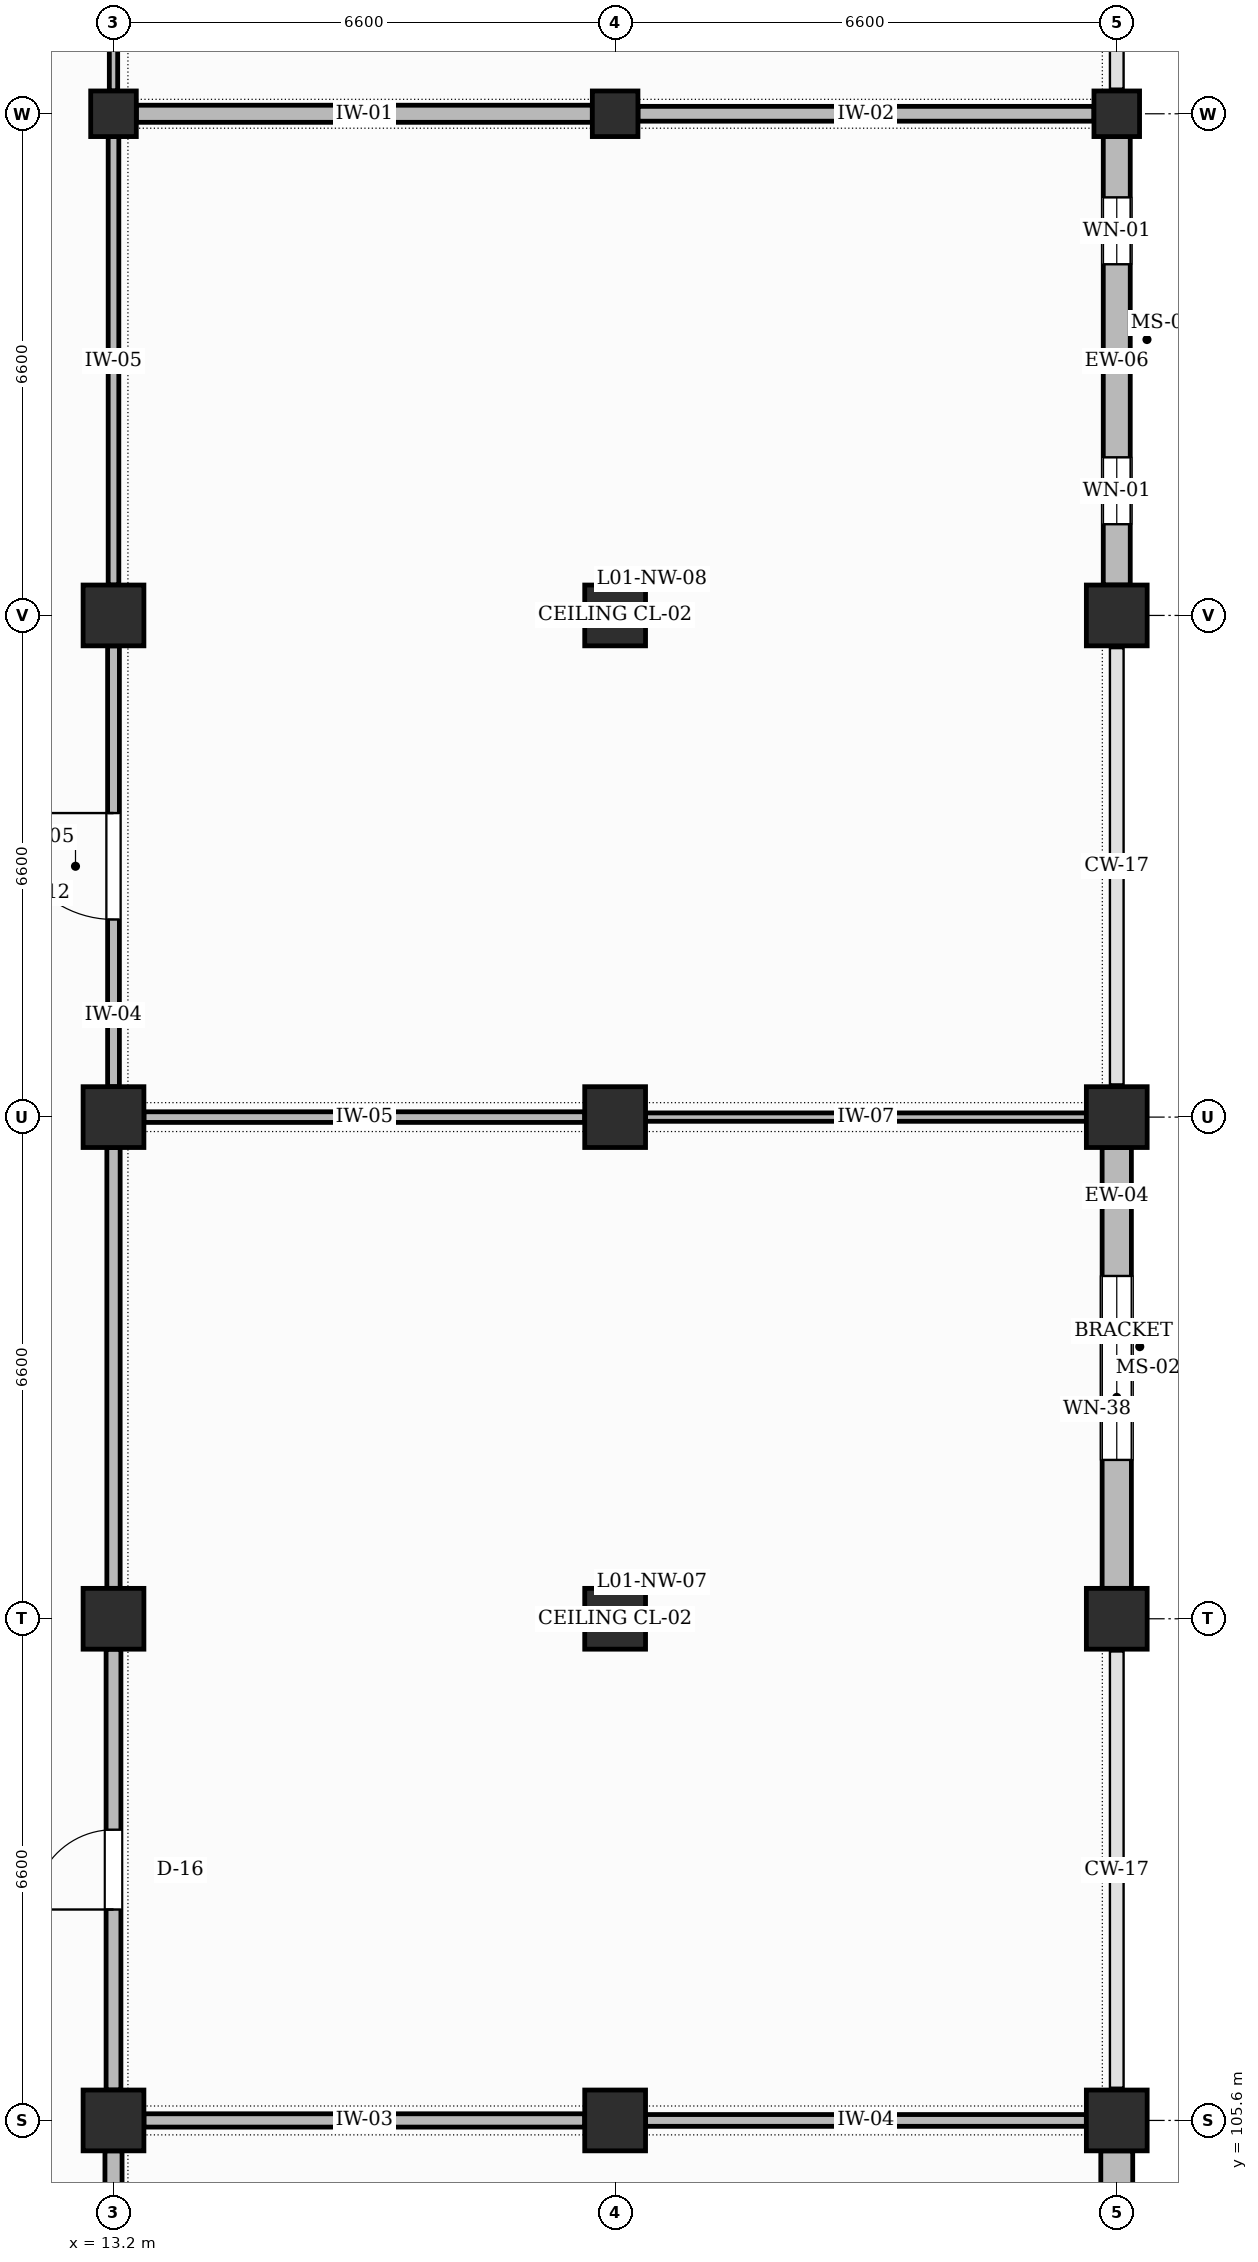
"""IFC4 building model, lengths in metres.
Left out: names, types, materials, properties, quantities, classifications, styles, units other than length and angle.
Written with IfcOpenShell. Run it as: python <this file> out.ifc"""

import sys

from ifc_helpers import new_model, si_unit, direction, frame, frame_2d, origin, origin_2d, place, context, subcontext, project, spatial, rectangle, circle, extrude, element, fill, save


model = new_model("IFC4")
c1 = context("Model", 3, precision=1e-05, world=origin(), true_north=direction((0.0, 1.0)))
c2 = subcontext(c1, "Body", "Model", "MODEL_VIEW")
j1 = project(units=[si_unit("LENGTHUNIT", "METRE"), si_unit("PLANEANGLEUNIT", "RADIAN")], contexts=[c1])
p1 = place(None, origin())
s1 = spatial("IfcSite", under=j1, at=p1, CompositionType="ELEMENT")
p2 = place(p1, origin())
s2 = spatial("IfcBuilding", under=s1, at=p2, CompositionType="ELEMENT")
p3 = place(p2, frame((0.0, 0.0, 5.4)))
s3 = spatial("IfcBuildingStorey", under=s2, at=p3, CompositionType="ELEMENT", Elevation=5.4)
for number, where, z_axis, x_axis in (
    (1, (13.2, 105.6, 0.0), (0.0, 0.0, 1.0), (1.0, 0.0, 0.0)),
    (2, (13.2, 112.2, 0.0), (0.0, 0.0, 1.0), (1.0, 0.0, 0.0)),
    (3, (13.2, 118.8, 0.0), (0.0, 0.0, 1.0), (1.0, 0.0, 0.0)),
    (4, (13.2, 125.4, 0.0), (0.0, 0.0, 1.0), (1.0, 0.0, 0.0)),
):
    element("IfcColumn", number, at=place(p3, frame(where, z_axis=z_axis, x_axis=x_axis)), inside=s3, PredefinedType="COLUMN", context=c2, shape_type="SweptSolid", body=[
        extrude(rectangle(XDim=0.8, YDim=0.8, at=origin_2d()), origin(), (0.0, 0.0, 1.0), 4.8),
    ])
p4 = place(p3, frame((13.2, 132.0, 0.0), z_axis=(0.0, 0.0, 1.0), x_axis=(1.0, 0.0, 0.0)))
e5 = element("IfcColumn", 5, at=p4, inside=s3, PredefinedType="COLUMN", context=c2, shape_type="SweptSolid", body=[
    extrude(circle(Radius=0.3, at=origin_2d()), origin(), (0.0, 0.0, 1.0), 4.8),
])
for number, where, z_axis, x_axis in (
    (6, (19.8, 105.6, 0.0), (0.0, 0.0, 1.0), (1.0, 0.0, 0.0)),
    (7, (19.8, 112.2, 0.0), (0.0, 0.0, 1.0), (1.0, 0.0, 0.0)),
    (8, (19.8, 118.8, 0.0), (0.0, 0.0, 1.0), (1.0, 0.0, 0.0)),
    (9, (19.8, 125.4, 0.0), (0.0, 0.0, 1.0), (1.0, 0.0, 0.0)),
):
    element("IfcColumn", number, at=place(p3, frame(where, z_axis=z_axis, x_axis=x_axis)), inside=s3, PredefinedType="COLUMN", context=c2, shape_type="SweptSolid", body=[
        extrude(rectangle(XDim=0.8, YDim=0.8, at=origin_2d()), origin(), (0.0, 0.0, 1.0), 4.8),
    ])
p5 = place(p3, frame((19.8, 132.0, 0.0), z_axis=(0.0, 0.0, 1.0), x_axis=(1.0, 0.0, 0.0)))
e10 = element("IfcColumn", 10, at=p5, inside=s3, PredefinedType="COLUMN", context=c2, shape_type="SweptSolid", body=[
    extrude(circle(Radius=0.3, at=origin_2d()), origin(), (0.0, 0.0, 1.0), 4.8),
])
for number, where, z_axis, x_axis in (
    (11, (26.4, 105.6, 0.0), (0.0, 0.0, 1.0), (1.0, 0.0, 0.0)),
    (12, (26.4, 112.2, 0.0), (0.0, 0.0, 1.0), (1.0, 0.0, 0.0)),
    (13, (26.4, 118.8, 0.0), (0.0, 0.0, 1.0), (1.0, 0.0, 0.0)),
    (14, (26.4, 125.4, 0.0), (0.0, 0.0, 1.0), (1.0, 0.0, 0.0)),
):
    element("IfcColumn", number, at=place(p3, frame(where, z_axis=z_axis, x_axis=x_axis)), inside=s3, PredefinedType="COLUMN", context=c2, shape_type="SweptSolid", body=[
        extrude(rectangle(XDim=0.8, YDim=0.8, at=origin_2d()), origin(), (0.0, 0.0, 1.0), 4.8),
    ])
p6 = place(p3, frame((26.4, 132.0, 0.0), z_axis=(0.0, 0.0, 1.0), x_axis=(1.0, 0.0, 0.0)))
e15 = element("IfcColumn", 15, at=p6, inside=s3, PredefinedType="COLUMN", context=c2, shape_type="SweptSolid", body=[
    extrude(circle(Radius=0.3, at=origin_2d()), origin(), (0.0, 0.0, 1.0), 4.8),
])
p7 = place(p3, frame((26.4, 99.4, 0.0), z_axis=(0.0, 0.0, 1.0), x_axis=(0.0, 1.0, 0.0)))
e16 = element("IfcWall", 16, at=p7, inside=s3, PredefinedType="SOLIDWALL", context=c2, shape_type="SweptSolid", body=[
    extrude(rectangle(XDim=5.8, YDim=0.42, at=frame_2d((2.9, 0.0))), origin(), (0.0, 0.0, 1.0), 3.85),
])
p8 = place(p7, frame((2.07, 0.0, 0.95)))
e17 = element("IfcOpeningElement", 17, at=p8, cuts=e16, PredefinedType="OPENING", context=c2, shape_type="SweptSolid", body=[
    extrude(rectangle(XDim=1.66, YDim=2.14, at=frame_2d((0.83, 1.07))), frame((0.0, 0.22, 0.0), z_axis=(0.0, -1.0, 0.0), x_axis=(1.0, 0.0, 0.0)), (0.0, 0.0, 1.0), 0.44),
])
p9 = place(p3, frame((26.4, 112.6, 0.0), z_axis=(0.0, 0.0, 1.0), x_axis=(0.0, 1.0, 0.0)))
e18 = element("IfcWall", 18, at=p9, inside=s3, PredefinedType="SOLIDWALL", context=c2, shape_type="SweptSolid", body=[
    extrude(rectangle(XDim=5.8, YDim=0.385, at=frame_2d((2.9, 0.0))), origin(), (0.0, 0.0, 1.0), 3.85),
])
p10 = place(p9, frame((1.69, 0.0, 0.95)))
e19 = element("IfcOpeningElement", 19, at=p10, cuts=e18, PredefinedType="OPENING", context=c2, shape_type="SweptSolid", body=[
    extrude(rectangle(XDim=2.42, YDim=1.68, at=frame_2d((1.21, 0.84))), frame((0.0, 0.202, 0.0), z_axis=(0.0, -1.0, 0.0), x_axis=(1.0, 0.0, 0.0)), (0.0, 0.0, 1.0), 0.405),
])
p11 = place(p3, frame((26.4, 125.8, 0.0), z_axis=(0.0, 0.0, 1.0), x_axis=(0.0, 1.0, 0.0)))
e20 = element("IfcWall", 20, at=p11, inside=s3, PredefinedType="SOLIDWALL", context=c2, shape_type="SweptSolid", body=[
    extrude(rectangle(XDim=5.9, YDim=0.355, at=frame_2d((2.95, 0.0))), origin(), (0.0, 0.0, 1.0), 3.85),
])
p12 = place(p11, frame((0.8, 0.0, 0.95)))
e21 = element("IfcOpeningElement", 21, at=p12, cuts=e20, PredefinedType="OPENING", context=c2, shape_type="SweptSolid", body=[
    extrude(rectangle(XDim=0.88, YDim=1.3, at=frame_2d((0.44, 0.65))), frame((0.0, 0.188, 0.0), z_axis=(0.0, -1.0, 0.0), x_axis=(1.0, 0.0, 0.0)), (0.0, 0.0, 1.0), 0.375),
])
p13 = place(p11, frame((4.22, 0.0, 0.95)))
e22 = element("IfcOpeningElement", 22, at=p13, cuts=e20, PredefinedType="OPENING", context=c2, shape_type="SweptSolid", body=[
    extrude(rectangle(XDim=0.88, YDim=1.3, at=frame_2d((0.44, 0.65))), frame((0.0, 0.188, 0.0), z_axis=(0.0, -1.0, 0.0), x_axis=(1.0, 0.0, 0.0)), (0.0, 0.0, 1.0), 0.375),
])
p14 = place(p3, frame((13.2, 99.4, 0.0), z_axis=(0.0, 0.0, 1.0), x_axis=(0.0, 1.0, 0.0)))
e23 = element("IfcWall", 23, at=p14, inside=s3, PredefinedType="PARTITIONING", context=c2, shape_type="SweptSolid", body=[
    extrude(rectangle(XDim=5.8, YDim=0.225, at=frame_2d((2.9, 0.0))), origin(), (0.0, 0.0, 1.0), 3.7),
])
p15 = place(p3, frame((13.2, 106.0, 0.0), z_axis=(0.0, 0.0, 1.0), x_axis=(0.0, 1.0, 0.0)))
e24 = element("IfcWall", 24, at=p15, inside=s3, PredefinedType="PARTITIONING", context=c2, shape_type="SweptSolid", body=[
    extrude(rectangle(XDim=5.8, YDim=0.195, at=frame_2d((2.9, 0.0))), origin(), (0.0, 0.0, 1.0), 3.7),
])
p16 = place(p15, frame((2.375, 0.0, 0.0)))
e25 = element("IfcOpeningElement", 25, at=p16, cuts=e24, PredefinedType="OPENING", context=c2, shape_type="SweptSolid", body=[
    extrude(rectangle(XDim=1.05, YDim=2.15, at=frame_2d((0.525, 1.075))), frame((0.0, 0.107, 0.0), z_axis=(0.0, -1.0, 0.0), x_axis=(1.0, 0.0, 0.0)), (0.0, 0.0, 1.0), 0.215),
])
p17 = place(p3, frame((13.2, 112.6, 0.0), z_axis=(0.0, 0.0, 1.0), x_axis=(0.0, 1.0, 0.0)))
e26 = element("IfcWall", 26, at=p17, inside=s3, PredefinedType="PARTITIONING", context=c2, shape_type="SweptSolid", body=[
    extrude(rectangle(XDim=5.8, YDim=0.175, at=frame_2d((2.9, 0.0))), origin(), (0.0, 0.0, 1.0), 3.7),
])
p18 = place(p3, frame((13.2, 119.2, 0.0), z_axis=(0.0, 0.0, 1.0), x_axis=(0.0, 1.0, 0.0)))
e27 = element("IfcWall", 27, at=p18, inside=s3, PredefinedType="PARTITIONING", context=c2, shape_type="SweptSolid", body=[
    extrude(rectangle(XDim=5.8, YDim=0.155, at=frame_2d((2.9, 0.0))), origin(), (0.0, 0.0, 1.0), 3.7),
])
p19 = place(p18, frame((2.2, 0.0, 0.0)))
e28 = element("IfcOpeningElement", 28, at=p19, cuts=e27, PredefinedType="OPENING", context=c2, shape_type="SweptSolid", body=[
    extrude(rectangle(XDim=1.4, YDim=2.25, at=frame_2d((0.7, 1.125))), frame((0.0, 0.087, 0.0), z_axis=(0.0, -1.0, 0.0), x_axis=(1.0, 0.0, 0.0)), (0.0, 0.0, 1.0), 0.175),
])
p20 = place(p3, frame((13.2, 125.8, 0.0), z_axis=(0.0, 0.0, 1.0), x_axis=(0.0, 1.0, 0.0)))
e29 = element("IfcWall", 29, at=p20, inside=s3, PredefinedType="PARTITIONING", context=c2, shape_type="SweptSolid", body=[
    extrude(rectangle(XDim=5.9, YDim=0.14, at=frame_2d((2.95, 0.0))), origin(), (0.0, 0.0, 1.0), 3.7),
])
p21 = place(p3, frame((13.2, 132.3, 0.0), z_axis=(0.0, 0.0, 1.0), x_axis=(0.0, 1.0, 0.0)))
e30 = element("IfcWall", 30, at=p21, inside=s3, PredefinedType="PARTITIONING", context=c2, shape_type="SweptSolid", body=[
    extrude(rectangle(XDim=6.0, YDim=0.11, at=frame_2d((3.0, 0.0))), origin(), (0.0, 0.0, 1.0), 3.7),
])
p22 = place(p21, frame((2.325, 0.0, 0.0)))
e31 = element("IfcOpeningElement", 31, at=p22, cuts=e30, PredefinedType="OPENING", context=c2, shape_type="SweptSolid", body=[
    extrude(rectangle(XDim=1.35, YDim=2.3, at=frame_2d((0.675, 1.15))), frame((0.0, 0.065, 0.0), z_axis=(0.0, -1.0, 0.0), x_axis=(1.0, 0.0, 0.0)), (0.0, 0.0, 1.0), 0.13),
])
p23 = place(p3, frame((13.6, 105.6, 0.0), z_axis=(0.0, 0.0, 1.0), x_axis=(1.0, 0.0, 0.0)))
e32 = element("IfcWall", 32, at=p23, inside=s3, PredefinedType="PARTITIONING", context=c2, shape_type="SweptSolid", body=[
    extrude(rectangle(XDim=5.8, YDim=0.175, at=frame_2d((2.9, 0.0))), origin(), (0.0, 0.0, 1.0), 3.6),
])
p24 = place(p3, frame((13.6, 118.8, 0.0), z_axis=(0.0, 0.0, 1.0), x_axis=(1.0, 0.0, 0.0)))
e33 = element("IfcWall", 33, at=p24, inside=s3, PredefinedType="PARTITIONING", context=c2, shape_type="SweptSolid", body=[
    extrude(rectangle(XDim=5.8, YDim=0.14, at=frame_2d((2.9, 0.0))), origin(), (0.0, 0.0, 1.0), 3.6),
])
p25 = place(p3, frame((13.5, 132.0, 0.0), z_axis=(0.0, 0.0, 1.0), x_axis=(1.0, 0.0, 0.0)))
e34 = element("IfcWall", 34, at=p25, inside=s3, PredefinedType="PARTITIONING", context=c2, shape_type="SweptSolid", body=[
    extrude(rectangle(XDim=6.0, YDim=0.225, at=frame_2d((3.0, 0.0))), origin(), (0.0, 0.0, 1.0), 3.6),
])
p26 = place(p3, frame((20.2, 105.6, 0.0), z_axis=(0.0, 0.0, 1.0), x_axis=(1.0, 0.0, 0.0)))
e35 = element("IfcWall", 35, at=p26, inside=s3, PredefinedType="PARTITIONING", context=c2, shape_type="SweptSolid", body=[
    extrude(rectangle(XDim=5.8, YDim=0.155, at=frame_2d((2.9, 0.0))), origin(), (0.0, 0.0, 1.0), 4.0),
])
p27 = place(p3, frame((20.2, 118.8, 0.0), z_axis=(0.0, 0.0, 1.0), x_axis=(1.0, 0.0, 0.0)))
e36 = element("IfcWall", 36, at=p27, inside=s3, PredefinedType="PARTITIONING", context=c2, shape_type="SweptSolid", body=[
    extrude(rectangle(XDim=5.8, YDim=0.11, at=frame_2d((2.9, 0.0))), origin(), (0.0, 0.0, 1.0), 3.7),
])
p28 = place(p3, frame((20.1, 132.0, 0.0), z_axis=(0.0, 0.0, 1.0), x_axis=(1.0, 0.0, 0.0)))
e37 = element("IfcWall", 37, at=p28, inside=s3, PredefinedType="PARTITIONING", context=c2, shape_type="SweptSolid", body=[
    extrude(rectangle(XDim=6.0, YDim=0.195, at=frame_2d((3.0, 0.0))), origin(), (0.0, 0.0, 1.0), 3.7),
])
p29 = place(p10, origin())
e38 = element("IfcWindow", 38, at=p29, inside=s3, PartitioningType="DOUBLE_PANEL_VERTICAL", PredefinedType="WINDOW", context=c2, shape_type="SweptSolid", body=[
    extrude(rectangle(XDim=2.42, YDim=1.68, at=frame_2d((1.21, 0.84))), frame((0.0, 0.03, 0.0), z_axis=(0.0, -1.0, 0.0), x_axis=(1.0, 0.0, 0.0)), (0.0, 0.0, 1.0), 0.06),
])
fill(e19, e38)
p30 = place(p12, origin())
e39 = element("IfcWindow", 39, at=p30, inside=s3, PartitioningType="SINGLE_PANEL", PredefinedType="WINDOW", context=c2, shape_type="SweptSolid", body=[
    extrude(rectangle(XDim=0.88, YDim=1.3, at=frame_2d((0.44, 0.65))), frame((0.0, 0.03, 0.0), z_axis=(0.0, -1.0, 0.0), x_axis=(1.0, 0.0, 0.0)), (0.0, 0.0, 1.0), 0.06),
])
fill(e21, e39)
p31 = place(p13, origin())
e40 = element("IfcWindow", 40, at=p31, inside=s3, PartitioningType="SINGLE_PANEL", PredefinedType="WINDOW", context=c2, shape_type="SweptSolid", body=[
    extrude(rectangle(XDim=0.88, YDim=1.3, at=frame_2d((0.44, 0.65))), frame((0.0, 0.03, 0.0), z_axis=(0.0, -1.0, 0.0), x_axis=(1.0, 0.0, 0.0)), (0.0, 0.0, 1.0), 0.06),
])
fill(e22, e40)
p32 = place(p16, origin())
e41 = element("IfcDoor", 41, at=p32, inside=s3, OperationType="SINGLE_SWING_LEFT", PredefinedType="DOOR", context=c2, shape_type="SweptSolid", body=[
    extrude(rectangle(XDim=1.05, YDim=2.15, at=frame_2d((0.525, 1.075))), frame((0.0, 0.025, 0.0), z_axis=(0.0, -1.0, 0.0), x_axis=(1.0, 0.0, 0.0)), (0.0, 0.0, 1.0), 0.05),
])
fill(e25, e41)
p33 = place(p19, origin())
e42 = element("IfcDoor", 42, at=p33, inside=s3, OperationType="SINGLE_SWING_RIGHT", PredefinedType="DOOR", context=c2, shape_type="SweptSolid", body=[
    extrude(rectangle(XDim=1.4, YDim=2.25, at=frame_2d((0.7, 1.125))), frame((0.0, 0.025, 0.0), z_axis=(0.0, -1.0, 0.0), x_axis=(1.0, 0.0, 0.0)), (0.0, 0.0, 1.0), 0.05),
])
fill(e28, e42)
save(model, sys.argv[1])
